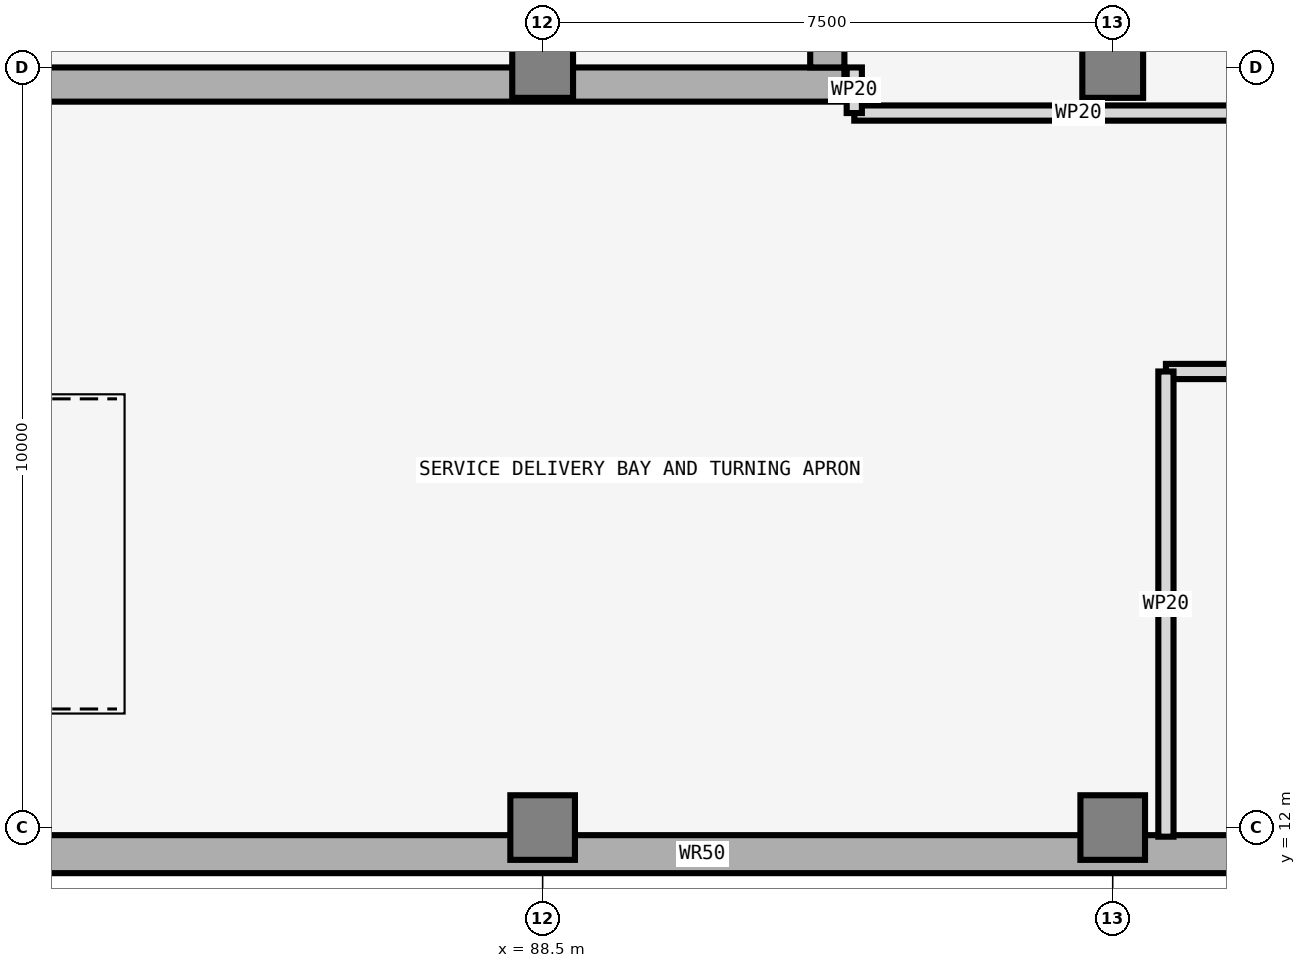
"""IFC4 building model, lengths in metres.
Left out: names, types, materials, properties, quantities, classifications, styles, units other than length and angle.
Written with IfcOpenShell. Run it as: python <this file> out.ifc"""

import sys

from ifc_helpers import new_model, si_unit, direction, frame, frame_2d, origin, origin_2d, place, context, subcontext, project, spatial, rectangle, extrude, element, save


model = new_model("IFC4")
c1 = context("Model", 3, precision=1e-05, world=origin(), true_north=direction((0.0, 1.0)))
c2 = subcontext(c1, "Body", "Model", "MODEL_VIEW")
j1 = project(units=[si_unit("LENGTHUNIT", "METRE"), si_unit("PLANEANGLEUNIT", "RADIAN")], contexts=[c1])
p1 = place(None, origin())
s1 = spatial("IfcSite", under=j1, at=p1, CompositionType="ELEMENT")
p2 = place(p1, origin())
s2 = spatial("IfcBuilding", under=s1, at=p2, CompositionType="ELEMENT")
p3 = place(p2, frame((0.0, 0.0, -5.4)))
s3 = spatial("IfcBuildingStorey", under=s2, at=p3, CompositionType="ELEMENT", Elevation=-5.4)
p4 = place(p3, frame((125.4, 11.65, 0.0), z_axis=(0.0, 0.0, 1.0), x_axis=(-1.0, 0.0, 0.0)))
e1 = element("IfcWall", 1, at=p4, inside=s3, PredefinedType="USERDEFINED", context=c2, shape_type="SweptSolid", body=[
    extrude(rectangle(XDim=69.6, YDim=0.5, at=frame_2d((34.8, 0.0))), origin(), (0.0, 0.0, 1.0), 5.08),
])
p5 = place(p3, frame((41.55, 21.775, 0.0), z_axis=(0.0, 0.0, 1.0), x_axis=(1.0, 0.0, 0.0)))
e2 = element("IfcWall", 2, at=p5, inside=s3, PredefinedType="SOLIDWALL", context=c2, shape_type="SweptSolid", body=[
    extrude(rectangle(XDim=50.92, YDim=0.45, at=frame_2d((25.46, 0.0))), origin(), (0.0, 0.0, 1.0), 5.08),
])
p6 = place(p3, frame((92.245, 22.0, 0.0), z_axis=(0.0, 0.0, 1.0), x_axis=(0.0, 1.0, 0.0)))
e3 = element("IfcWall", 3, at=p6, inside=s3, PredefinedType="SOLIDWALL", context=c2, shape_type="SweptSolid", body=[
    extrude(rectangle(XDim=25.0, YDim=0.45, at=frame_2d((12.5, 0.0))), origin(), (0.0, 0.0, 1.0), 5.08),
])
p7 = place(p3, frame((88.5, 12.0, 0.0), z_axis=(0.0, 0.0, 1.0), x_axis=(1.0, 0.0, 0.0)))
e4 = element("IfcColumn", 4, at=p7, inside=s3, PredefinedType="COLUMN", context=c2, shape_type="SweptSolid", body=[
    extrude(rectangle(XDim=0.85, YDim=0.85, at=origin_2d()), origin(), (0.0, 0.0, 1.0), 5.4),
])
p8 = place(p3, frame((88.5, 22.0, 0.0), z_axis=(0.0, 0.0, 1.0), x_axis=(1.0, 0.0, 0.0)))
e5 = element("IfcColumn", 5, at=p8, inside=s3, PredefinedType="COLUMN", context=c2, shape_type="SweptSolid", body=[
    extrude(rectangle(XDim=0.8, YDim=0.8, at=origin_2d()), origin(), (0.0, 0.0, 1.0), 5.4),
])
p9 = place(p3, frame((96.0, 12.0, 0.0), z_axis=(0.0, 0.0, 1.0), x_axis=(1.0, 0.0, 0.0)))
e6 = element("IfcColumn", 6, at=p9, inside=s3, PredefinedType="COLUMN", context=c2, shape_type="SweptSolid", body=[
    extrude(rectangle(XDim=0.85, YDim=0.85, at=origin_2d()), origin(), (0.0, 0.0, 1.0), 5.4),
])
p10 = place(p3, frame((96.0, 22.0, 0.0), z_axis=(0.0, 0.0, 1.0), x_axis=(1.0, 0.0, 0.0)))
e7 = element("IfcColumn", 7, at=p10, inside=s3, PredefinedType="COLUMN", context=c2, shape_type="SweptSolid", body=[
    extrude(rectangle(XDim=0.8, YDim=0.8, at=origin_2d()), origin(), (0.0, 0.0, 1.0), 5.4),
])
p11 = place(p3, frame((96.7, 18.0, 0.0), z_axis=(0.0, 0.0, 1.0), x_axis=(1.0, 0.0, 0.0)))
e8 = element("IfcWall", 8, at=p11, inside=s3, PredefinedType="PARTITIONING", context=c2, shape_type="SweptSolid", body=[
    extrude(rectangle(XDim=19.5, YDim=0.2, at=frame_2d((9.75, 0.0))), origin(), (0.0, 0.0, 1.0), 4.05),
])
p12 = place(p11, frame((13.45, 0.0, 0.0)))
e9 = element("IfcOpeningElement", 9, at=p12, cuts=e8, PredefinedType="OPENING", context=c2, shape_type="SweptSolid", body=[
    extrude(rectangle(XDim=1.4, YDim=2.2, at=frame_2d((0.7, 1.1))), frame((0.0, 0.11, 0.0), z_axis=(0.0, -1.0, 0.0), x_axis=(1.0, 0.0, 0.0)), (0.0, 0.0, 1.0), 0.22),
])
p13 = place(p3, frame((96.7, 11.88, 0.0), z_axis=(0.0, 0.0, 1.0), x_axis=(0.0, 1.0, 0.0)))
e10 = element("IfcWall", 10, at=p13, inside=s3, PredefinedType="PARTITIONING", context=c2, shape_type="SweptSolid", body=[
    extrude(rectangle(XDim=6.12, YDim=0.2, at=frame_2d((3.06, 0.0))), origin(), (0.0, 0.0, 1.0), 4.05),
])
p14 = place(p3, frame((98.5, 21.4, 0.0), z_axis=(0.0, 0.0, 1.0), x_axis=(-1.0, 0.0, 0.0)))
e11 = element("IfcWall", 11, at=p14, inside=s3, PredefinedType="PARTITIONING", context=c2, shape_type="SweptSolid", body=[
    extrude(rectangle(XDim=5.9, YDim=0.2, at=frame_2d((2.95, 0.0))), origin(), (0.0, 0.0, 1.0), 4.05),
])
p15 = place(p3, frame((92.6, 21.4, 0.0), z_axis=(0.0, 0.0, 1.0), x_axis=(0.0, 1.0, 0.0)))
e12 = element("IfcWall", 12, at=p15, inside=s3, PredefinedType="PARTITIONING", context=c2, shape_type="SweptSolid", body=[
    extrude(rectangle(XDim=0.6, YDim=0.2, at=frame_2d((0.3, 0.0))), origin(), (0.0, 0.0, 1.0), 4.05),
])
save(model, sys.argv[1])
